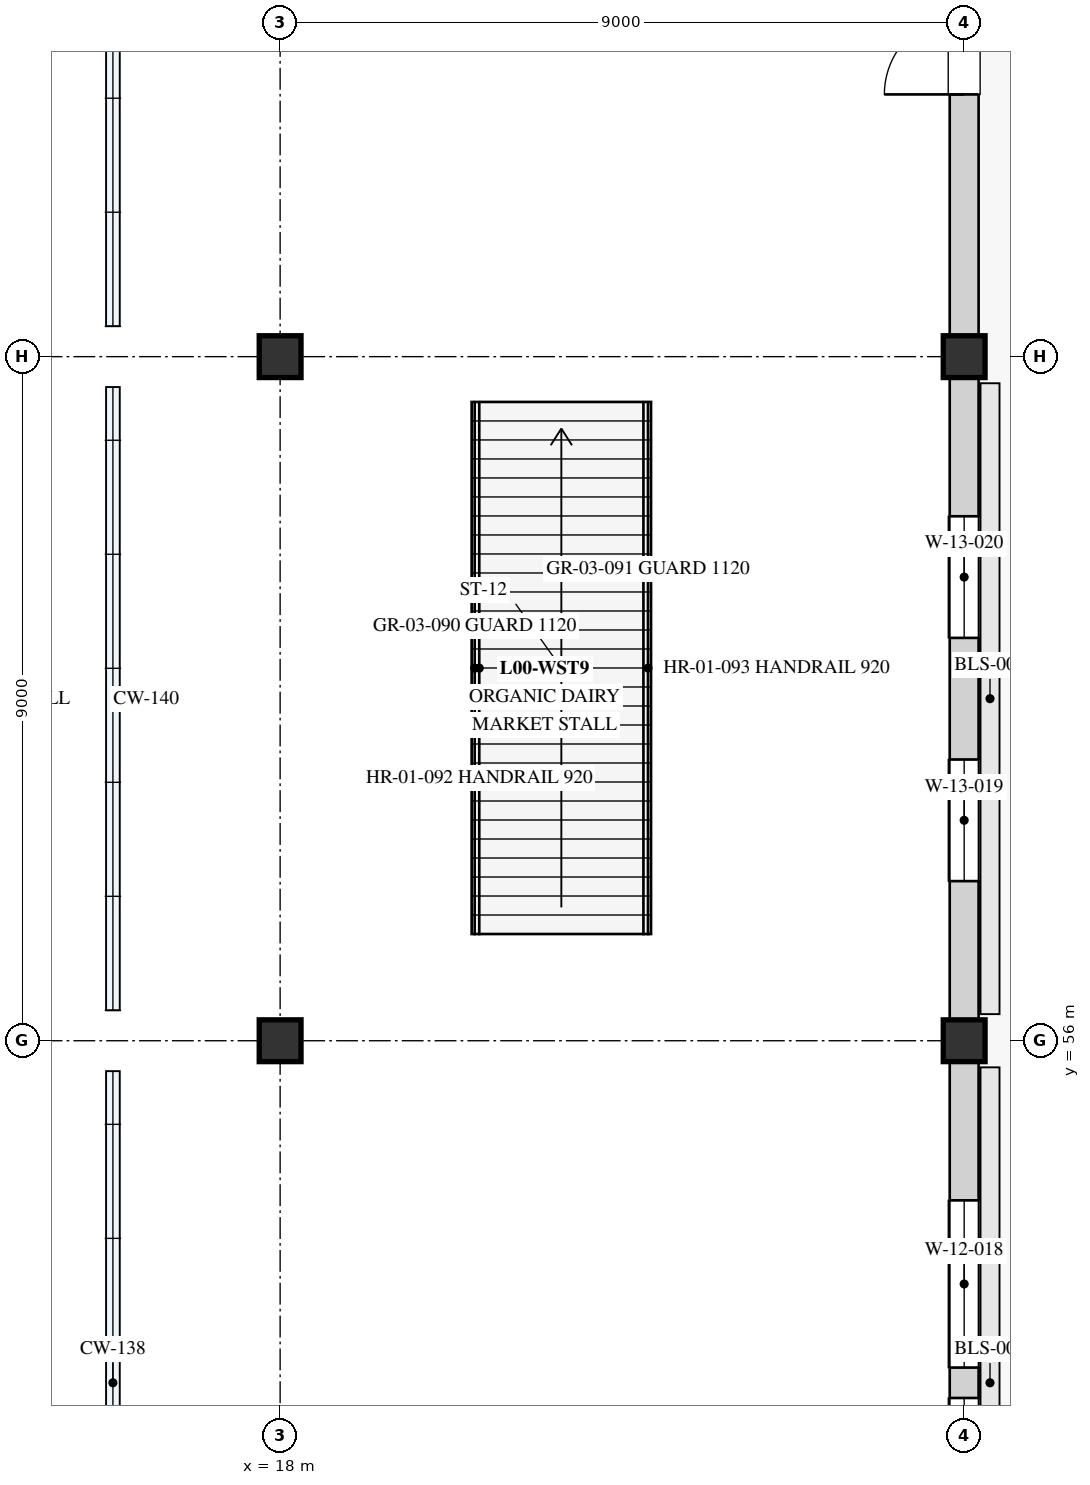
"""IFC4 building model, lengths in metres.
Left out: names, types, materials, properties, quantities, classifications, styles, units other than length and angle.
Written with IfcOpenShell. Run it as: python <this file> out.ifc"""

import sys

from ifc_helpers import new_model, si_unit, direction, frame, frame_2d, origin, origin_2d, place, context, subcontext, project, spatial, rectangle, extrude, element, fill, save


model = new_model("IFC4")
c1 = context("Model", 3, precision=1e-05, world=origin(), true_north=direction((0.0, 1.0)))
c2 = subcontext(c1, "Body", "Model", "MODEL_VIEW")
j1 = project(units=[si_unit("LENGTHUNIT", "METRE"), si_unit("PLANEANGLEUNIT", "RADIAN")], contexts=[c1])
p1 = place(None, origin())
s1 = spatial("IfcSite", under=j1, at=p1, CompositionType="ELEMENT")
p2 = place(p1, origin())
s2 = spatial("IfcBuilding", under=s1, at=p2, CompositionType="ELEMENT")
p3 = place(p2, origin())
s3 = spatial("IfcBuildingStorey", under=s2, at=p3, CompositionType="ELEMENT", Elevation=0.0)
for number, where, z_axis, x_axis in (
    (1, (18.0, 56.0, 0.0), (0.0, 0.0, 1.0), (1.0, 0.0, 0.0)),
    (2, (18.0, 65.0, 0.0), (0.0, 0.0, 1.0), (1.0, 0.0, 0.0)),
    (3, (27.0, 56.0, 0.0), (0.0, 0.0, 1.0), (1.0, 0.0, 0.0)),
    (4, (27.0, 65.0, 0.0), (0.0, 0.0, 1.0), (1.0, 0.0, 0.0)),
):
    element("IfcColumn", number, at=place(p3, frame(where, z_axis=z_axis, x_axis=x_axis)), inside=s3, PredefinedType="COLUMN", context=c2, shape_type="SweptSolid", body=[
        extrude(rectangle(XDim=0.55, YDim=0.55, at=origin_2d()), origin(), (0.0, 0.0, 1.0), 4.5),
    ])
p4 = place(p3, frame((27.0, 47.0, 0.0), z_axis=(0.0, 0.0, 1.0), x_axis=(0.0, 1.0, 0.0)))
e5 = element("IfcWall", 5, at=p4, inside=s3, PredefinedType="STANDARD", context=c2, shape_type="SweptSolid", body=[
    extrude(rectangle(XDim=9.0, YDim=0.38, at=frame_2d((4.5, 0.0))), origin(), (0.0, 0.0, 1.0), 3.35),
])
p5 = place(p4, frame((2.1, 0.0, 0.95)))
e6 = element("IfcOpeningElement", 6, at=p5, cuts=e5, PredefinedType="OPENING", context=c2, shape_type="SweptSolid", body=[
    extrude(rectangle(XDim=2.2, YDim=2.1, at=frame_2d((1.1, 1.05))), frame((0.0, 0.2, 0.0), z_axis=(0.0, -1.0, 0.0), x_axis=(1.0, 0.0, 0.0)), (0.0, 0.0, 1.0), 0.4),
])
p6 = place(p4, frame((4.7, 0.0, 0.95)))
e7 = element("IfcOpeningElement", 7, at=p6, cuts=e5, PredefinedType="OPENING", context=c2, shape_type="SweptSolid", body=[
    extrude(rectangle(XDim=2.2, YDim=2.1, at=frame_2d((1.1, 1.05))), frame((0.0, 0.2, 0.0), z_axis=(0.0, -1.0, 0.0), x_axis=(1.0, 0.0, 0.0)), (0.0, 0.0, 1.0), 0.4),
])
p7 = place(p3, frame((27.0, 56.0, 0.0), z_axis=(0.0, 0.0, 1.0), x_axis=(0.0, 1.0, 0.0)))
e8 = element("IfcWall", 8, at=p7, inside=s3, PredefinedType="STANDARD", context=c2, shape_type="SweptSolid", body=[
    extrude(rectangle(XDim=9.0, YDim=0.38, at=frame_2d((4.5, 0.0))), origin(), (0.0, 0.0, 1.0), 3.35),
])
p8 = place(p7, frame((2.1, 0.0, 0.95)))
e9 = element("IfcOpeningElement", 9, at=p8, cuts=e8, PredefinedType="OPENING", context=c2, shape_type="SweptSolid", body=[
    extrude(rectangle(XDim=1.6, YDim=2.1, at=frame_2d((0.8, 1.05))), frame((0.0, 0.2, 0.0), z_axis=(0.0, -1.0, 0.0), x_axis=(1.0, 0.0, 0.0)), (0.0, 0.0, 1.0), 0.4),
])
p9 = place(p7, frame((5.3, 0.0, 0.95)))
e10 = element("IfcOpeningElement", 10, at=p9, cuts=e8, PredefinedType="OPENING", context=c2, shape_type="SweptSolid", body=[
    extrude(rectangle(XDim=1.6, YDim=2.1, at=frame_2d((0.8, 1.05))), frame((0.0, 0.2, 0.0), z_axis=(0.0, -1.0, 0.0), x_axis=(1.0, 0.0, 0.0)), (0.0, 0.0, 1.0), 0.4),
])
p10 = place(p3, frame((27.0, 65.0, 0.0), z_axis=(0.0, 0.0, 1.0), x_axis=(0.0, 1.0, 0.0)))
e11 = element("IfcWall", 11, at=p10, inside=s3, PredefinedType="STANDARD", context=c2, shape_type="SweptSolid", body=[
    extrude(rectangle(XDim=9.0, YDim=0.38, at=frame_2d((4.5, 0.0))), origin(), (0.0, 0.0, 1.0), 3.35),
])
p11 = place(p10, frame((3.45, 0.0, 0.0)))
e12 = element("IfcOpeningElement", 12, at=p11, cuts=e11, PredefinedType="OPENING", context=c2, shape_type="SweptSolid", body=[
    extrude(rectangle(XDim=2.1, YDim=2.5, at=frame_2d((1.05, 1.25))), frame((0.0, 0.2, 0.0), z_axis=(0.0, -1.0, 0.0), x_axis=(1.0, 0.0, 0.0)), (0.0, 0.0, 1.0), 0.4),
])
p12 = place(p5, origin())
e13 = element("IfcWindow", 13, at=p12, inside=s3, PartitioningType="SINGLE_PANEL", PredefinedType="WINDOW", context=c2, shape_type="SweptSolid", body=[
    extrude(rectangle(XDim=2.2, YDim=2.1, at=frame_2d((1.1, 1.05))), frame((0.0, 0.03, 0.0), z_axis=(0.0, -1.0, 0.0), x_axis=(1.0, 0.0, 0.0)), (0.0, 0.0, 1.0), 0.06),
])
fill(e6, e13)
p13 = place(p6, origin())
e14 = element("IfcWindow", 14, at=p13, inside=s3, PartitioningType="SINGLE_PANEL", PredefinedType="WINDOW", context=c2, shape_type="SweptSolid", body=[
    extrude(rectangle(XDim=2.2, YDim=2.1, at=frame_2d((1.1, 1.05))), frame((0.0, 0.03, 0.0), z_axis=(0.0, -1.0, 0.0), x_axis=(1.0, 0.0, 0.0)), (0.0, 0.0, 1.0), 0.06),
])
fill(e7, e14)
p14 = place(p8, origin())
e15 = element("IfcWindow", 15, at=p14, inside=s3, PartitioningType="SINGLE_PANEL", PredefinedType="WINDOW", context=c2, shape_type="SweptSolid", body=[
    extrude(rectangle(XDim=1.6, YDim=2.1, at=frame_2d((0.8, 1.05))), frame((0.0, 0.03, 0.0), z_axis=(0.0, -1.0, 0.0), x_axis=(1.0, 0.0, 0.0)), (0.0, 0.0, 1.0), 0.06),
])
fill(e9, e15)
p15 = place(p9, origin())
e16 = element("IfcWindow", 16, at=p15, inside=s3, PartitioningType="SINGLE_PANEL", PredefinedType="WINDOW", context=c2, shape_type="SweptSolid", body=[
    extrude(rectangle(XDim=1.6, YDim=2.1, at=frame_2d((0.8, 1.05))), frame((0.0, 0.03, 0.0), z_axis=(0.0, -1.0, 0.0), x_axis=(1.0, 0.0, 0.0)), (0.0, 0.0, 1.0), 0.06),
])
fill(e10, e16)
p16 = place(p11, origin())
e17 = element("IfcDoor", 17, at=p16, inside=s3, OperationType="DOUBLE_DOOR_SINGLE_SWING", PredefinedType="DOOR", context=c2, shape_type="SweptSolid", body=[
    extrude(rectangle(XDim=2.1, YDim=2.5, at=frame_2d((1.05, 1.25))), frame((0.0, 0.025, 0.0), z_axis=(0.0, -1.0, 0.0), x_axis=(1.0, 0.0, 0.0)), (0.0, 0.0, 1.0), 0.05),
])
fill(e12, e17)
save(model, sys.argv[1])
